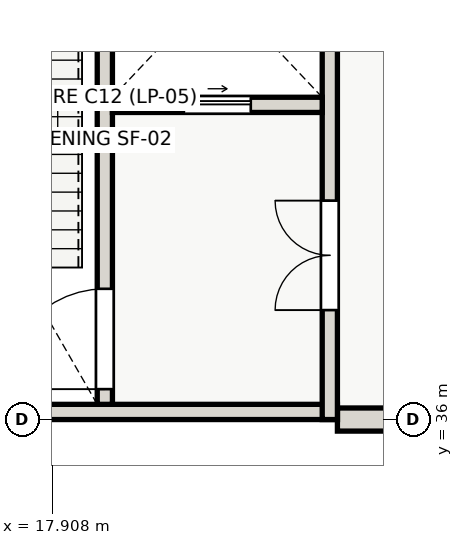
"""IFC4 building model, lengths in metres.
Left out: names, types, materials, properties, quantities, classifications, styles, units other than length and angle.
Written with IfcOpenShell. Run it as: python <this file> out.ifc"""

import sys

from ifc_helpers import new_model, si_unit, direction, frame, frame_2d, origin, place, context, subcontext, project, spatial, rectangle, extrude, element, fill, save


model = new_model("IFC4")
c1 = context("Model", 3, precision=1e-05, world=origin(), true_north=direction((0.0, 1.0)))
c2 = subcontext(c1, "Body", "Model", "MODEL_VIEW")
j1 = project(units=[si_unit("LENGTHUNIT", "METRE"), si_unit("PLANEANGLEUNIT", "RADIAN")], contexts=[c1])
p1 = place(None, origin())
s1 = spatial("IfcSite", under=j1, at=p1, CompositionType="ELEMENT")
p2 = place(p1, origin())
s2 = spatial("IfcBuilding", under=s1, at=p2, CompositionType="ELEMENT")
p3 = place(p2, frame((0.0, 0.0, 4.2)))
s3 = spatial("IfcBuildingStorey", under=s2, at=p3, CompositionType="ELEMENT", Elevation=4.2)
p4 = place(p3, frame((24.0, 36.0, 0.0), z_axis=(0.0, 0.0, 1.0), x_axis=(-1.0, 0.0, 0.0)))
e1 = element("IfcWall", 1, at=p4, inside=s3, PredefinedType="SOLIDWALL", context=c2, shape_type="SweptSolid", body=[
    extrude(rectangle(XDim=1.4, YDim=0.38, at=frame_2d((0.7, 0.0))), origin(), (0.0, 0.0, 1.0), 3.56),
])
p5 = place(p3, frame((22.6, 36.125, 0.0), z_axis=(0.0, 0.0, 1.0), x_axis=(-1.0, 0.0, 0.0)))
e2 = element("IfcWall", 2, at=p5, inside=s3, PredefinedType="SHEAR", context=c2, shape_type="SweptSolid", body=[
    extrude(rectangle(XDim=9.2, YDim=0.25, at=frame_2d((4.6, 0.0))), origin(), (0.0, 0.0, 1.0), 4.2),
])
p6 = place(p3, frame((22.475, 36.0, 0.0), z_axis=(0.0, 0.0, 1.0), x_axis=(0.0, 1.0, 0.0)))
e3 = element("IfcWall", 3, at=p6, inside=s3, PredefinedType="SHEAR", context=c2, shape_type="SweptSolid", body=[
    extrude(rectangle(XDim=9.2, YDim=0.25, at=frame_2d((4.6, 0.0))), origin(), (0.0, 0.0, 1.0), 4.2),
])
p7 = place(p6, frame((1.8, 0.0, 0.0)))
e4 = element("IfcOpeningElement", 4, at=p7, cuts=e3, PredefinedType="OPENING", context=c2, shape_type="SweptSolid", body=[
    extrude(rectangle(XDim=1.8, YDim=2.15, at=frame_2d((0.9, 1.075))), frame((0.0, 0.135, 0.0), z_axis=(0.0, -1.0, 0.0), x_axis=(1.0, 0.0, 0.0)), (0.0, 0.0, 1.0), 0.27),
])
p8 = place(p3, frame((18.775, 36.25, 0.0), z_axis=(0.0, 0.0, 1.0), x_axis=(0.0, 1.0, 0.0)))
e5 = element("IfcWall", 5, at=p8, inside=s3, PredefinedType="SHEAR", context=c2, shape_type="SweptSolid", body=[
    extrude(rectangle(XDim=8.7, YDim=0.25, at=frame_2d((4.35, 0.0))), origin(), (0.0, 0.0, 1.0), 4.2),
])
p9 = place(p8, frame((0.25, 0.0, 0.0)))
e6 = element("IfcOpeningElement", 6, at=p9, cuts=e5, PredefinedType="OPENING", context=c2, shape_type="SweptSolid", body=[
    extrude(rectangle(XDim=1.65, YDim=2.1, at=frame_2d((0.825, 1.05))), frame((0.0, 0.135, 0.0), z_axis=(0.0, -1.0, 0.0), x_axis=(1.0, 0.0, 0.0)), (0.0, 0.0, 1.0), 0.27),
])
p10 = place(p3, frame((18.9, 41.175, 0.0), z_axis=(0.0, 0.0, 1.0), x_axis=(1.0, 0.0, 0.0)))
e7 = element("IfcWall", 7, at=p10, inside=s3, PredefinedType="SHEAR", context=c2, shape_type="SweptSolid", body=[
    extrude(rectangle(XDim=3.45, YDim=0.25, at=frame_2d((1.725, 0.0))), origin(), (0.0, 0.0, 1.0), 4.2),
])
p11 = place(p10, frame((1.175, 0.0, 0.0)))
e8 = element("IfcOpeningElement", 8, at=p11, cuts=e7, PredefinedType="OPENING", context=c2, shape_type="SweptSolid", body=[
    extrude(rectangle(XDim=1.1, YDim=2.1, at=frame_2d((0.55, 1.05))), frame((0.0, 0.135, 0.0), z_axis=(0.0, -1.0, 0.0), x_axis=(1.0, 0.0, 0.0)), (0.0, 0.0, 1.0), 0.27),
])
p12 = place(p7, origin())
e9 = element("IfcDoor", 9, at=p12, inside=s3, OperationType="DOUBLE_DOOR_SINGLE_SWING", PredefinedType="DOOR", context=c2, shape_type="SweptSolid", body=[
    extrude(rectangle(XDim=1.8, YDim=2.15, at=frame_2d((0.9, 1.075))), frame((0.0, 0.025, 0.0), z_axis=(0.0, -1.0, 0.0), x_axis=(1.0, 0.0, 0.0)), (0.0, 0.0, 1.0), 0.05),
])
fill(e4, e9)
p13 = place(p9, origin())
e10 = element("IfcDoor", 10, at=p13, inside=s3, OperationType="SINGLE_SWING_LEFT", PredefinedType="DOOR", context=c2, shape_type="SweptSolid", body=[
    extrude(rectangle(XDim=1.65, YDim=2.1, at=frame_2d((0.825, 1.05))), frame((0.0, 0.025, 0.0), z_axis=(0.0, -1.0, 0.0), x_axis=(1.0, 0.0, 0.0)), (0.0, 0.0, 1.0), 0.05),
])
fill(e6, e10)
p14 = place(p11, origin())
e11 = element("IfcDoor", 11, at=p14, inside=s3, OperationType="SLIDING_TO_RIGHT", PredefinedType="DOOR", context=c2, shape_type="SweptSolid", body=[
    extrude(rectangle(XDim=1.1, YDim=2.1, at=frame_2d((0.55, 1.05))), frame((0.0, 0.025, 0.0), z_axis=(0.0, -1.0, 0.0), x_axis=(1.0, 0.0, 0.0)), (0.0, 0.0, 1.0), 0.05),
])
fill(e8, e11)
save(model, sys.argv[1])
